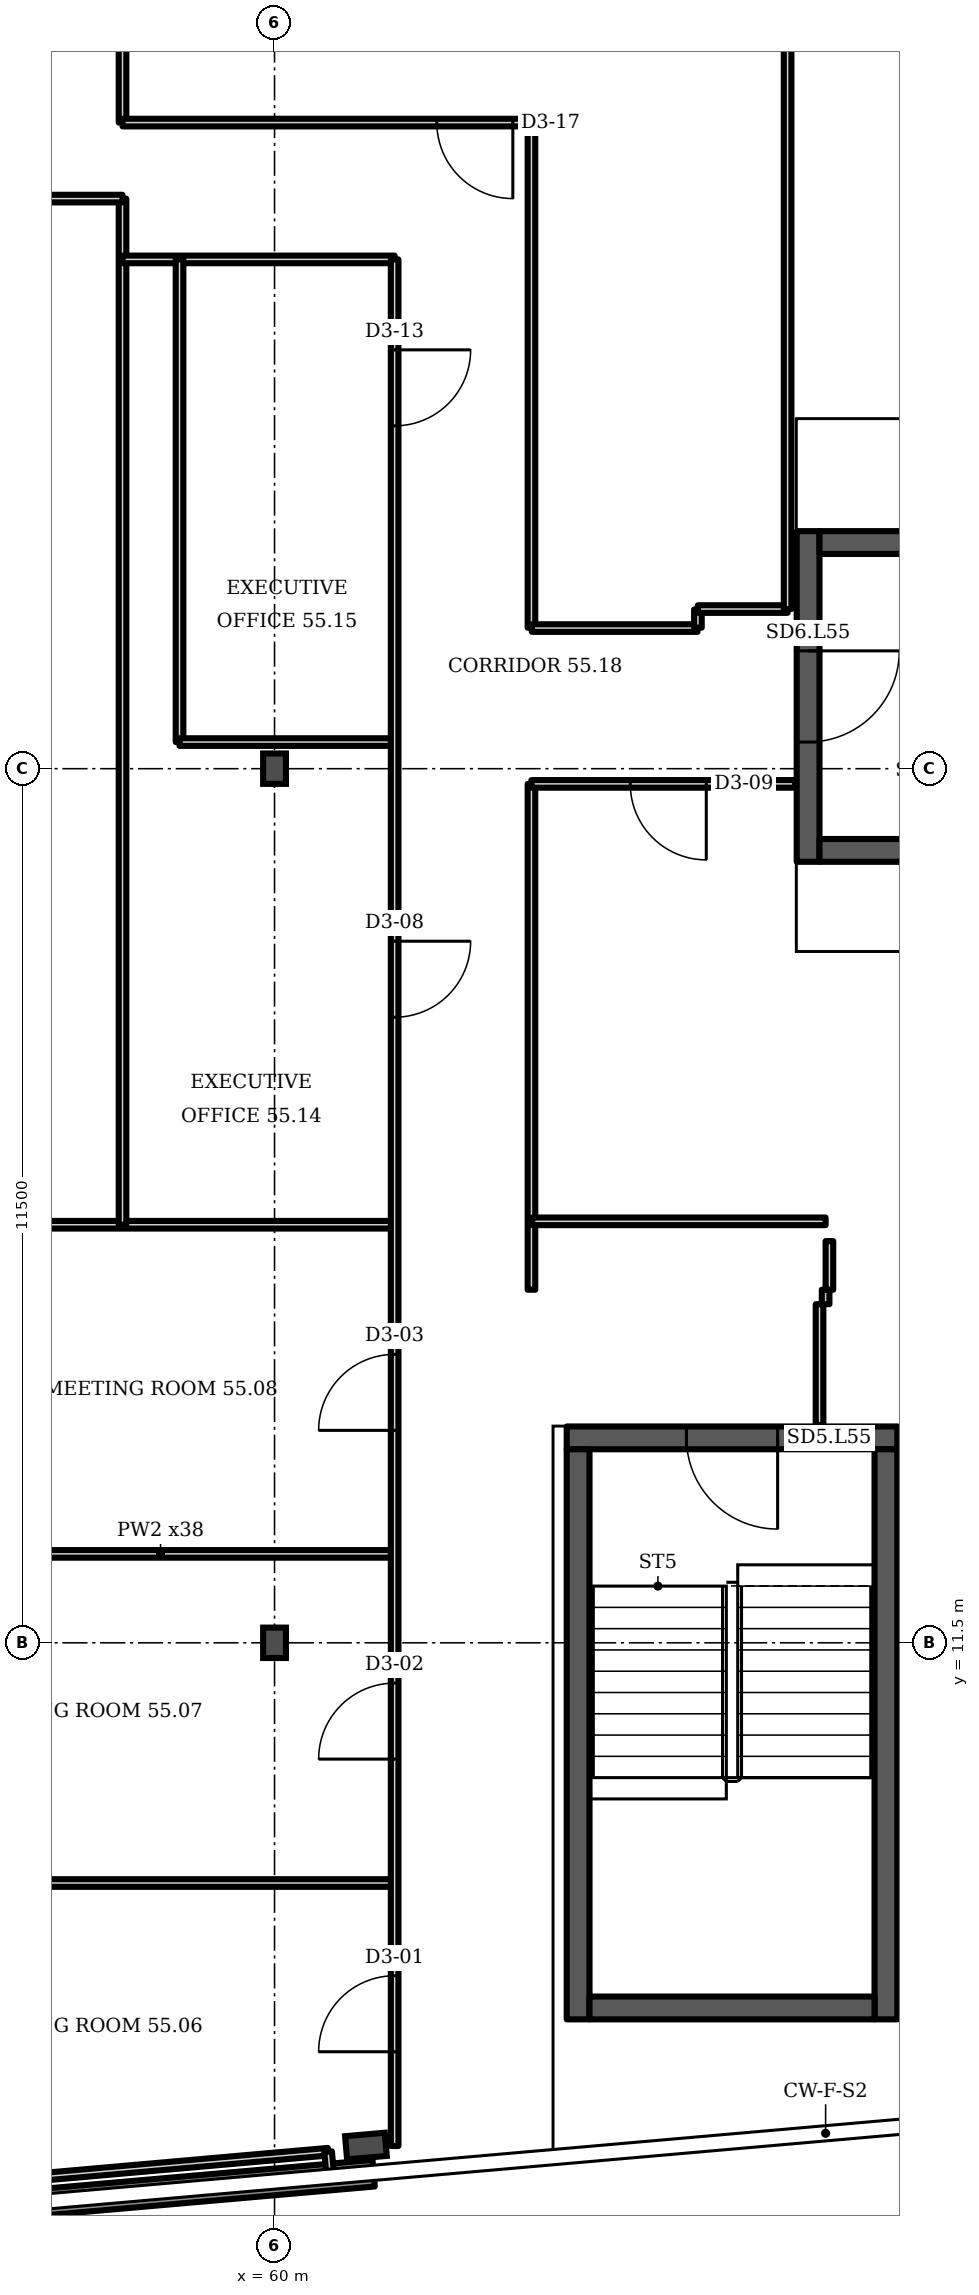
"""IFC4 building model, lengths in metres.
Left out: names, types, materials, properties, quantities, classifications, styles, units other than length and angle.
Written with IfcOpenShell. Run it as: python <this file> out.ifc"""

import sys

from ifc_helpers import new_model, si_unit, direction, frame, frame_2d, origin, origin_2d, place, context, subcontext, project, spatial, rectangle, i_section, extrude, element, fill, save


model = new_model("IFC4")
c1 = context("Model", 3, precision=1e-05, world=origin(), true_north=direction((0.0, 1.0)))
c2 = subcontext(c1, "Body", "Model", "MODEL_VIEW")
j1 = project(units=[si_unit("LENGTHUNIT", "METRE"), si_unit("PLANEANGLEUNIT", "RADIAN")], contexts=[c1])
p1 = place(None, origin())
s1 = spatial("IfcSite", under=j1, at=p1, CompositionType="ELEMENT")
p2 = place(p1, origin())
s2 = spatial("IfcBuilding", under=s1, at=p2, CompositionType="ELEMENT")
p3 = place(p2, frame((0.0, 0.0, 221.5)))
s3 = spatial("IfcBuildingStorey", under=s2, at=p3, CompositionType="ELEMENT", Elevation=221.5)
p4 = place(p3, frame((61.202, 4.879, 0.0), z_axis=(0.0, 0.0, 1.0), x_axis=(0.087156, -0.996197, 0.0)))
e1 = element("IfcColumn", 1, at=p4, inside=s3, PredefinedType="COLUMN", context=c2, shape_type="SweptSolid", body=[
    extrude(i_section(OverallWidth=0.306, OverallDepth=0.524, WebThickness=0.021, FlangeThickness=0.04, FilletRadius=0.027, at=origin_2d()), origin(), (0.0, 0.0, 1.0), 3.6),
])
for number, where, z_axis, x_axis in (
    (2, (60.0, 11.5, 0.0), (0.0, 0.0, 1.0), (1.0, 0.0, 0.0)),
    (3, (60.0, 23.0, 0.0), (0.0, 0.0, 1.0), (1.0, 0.0, 0.0)),
):
    element("IfcColumn", number, at=place(p3, frame(where, z_axis=z_axis, x_axis=x_axis)), inside=s3, PredefinedType="COLUMN", context=c2, shape_type="SweptSolid", body=[
        extrude(i_section(OverallWidth=0.3, OverallDepth=0.4, WebThickness=0.013, FlangeThickness=0.024, FilletRadius=0.027, at=origin_2d()), origin(), (0.0, 0.0, 1.0), 3.6),
    ])
p5 = place(p3, frame((49.545, 3.493, 0.0), z_axis=(0.0, 0.0, 1.0), x_axis=(0.996196, 0.087141, 0.0)))
e4 = element("IfcWall", 4, at=p5, inside=s3, PredefinedType="SOLIDWALL", context=c2, shape_type="SweptSolid", body=[
    extrude(rectangle(XDim=11.803, YDim=0.35, at=frame_2d((5.902, 0.0))), origin(), (0.0, 0.0, 1.0), 1.0),
])
p6 = place(p3, frame((63.844, 14.196, 0.0), z_axis=(0.0, 0.0, 1.0), x_axis=(1.0, 0.0, 0.0)))
e5 = element("IfcWall", 5, at=p6, inside=s3, PredefinedType="SHEAR", context=c2, shape_type="SweptSolid", body=[
    extrude(rectangle(XDim=4.35, YDim=0.3, at=frame_2d((2.175, 0.0))), origin(), (0.0, 0.0, 1.0), 3.2),
])
p7 = place(p6, frame((1.575, 0.0, 0.0)))
e6 = element("IfcOpeningElement", 6, at=p7, cuts=e5, PredefinedType="OPENING", context=c2, shape_type="SweptSolid", body=[
    extrude(rectangle(XDim=1.2, YDim=2.1, at=frame_2d((0.6, 1.05))), frame((0.0, 0.16, 0.0), z_axis=(0.0, -1.0, 0.0), x_axis=(1.0, 0.0, 0.0)), (0.0, 0.0, 1.0), 0.32),
])
p8 = place(p3, frame((67.02, 21.775, 0.0), z_axis=(0.0, 0.0, 1.0), x_axis=(0.0, 1.0, 0.0)))
e7 = element("IfcWall", 7, at=p8, inside=s3, PredefinedType="SHEAR", context=c2, shape_type="SweptSolid", body=[
    extrude(rectangle(XDim=4.35, YDim=0.3, at=frame_2d((2.175, 0.0))), origin(), (0.0, 0.0, 1.0), 3.2),
])
p9 = place(p8, frame((1.575, 0.0, 0.0)))
e8 = element("IfcOpeningElement", 8, at=p9, cuts=e7, PredefinedType="OPENING", context=c2, shape_type="SweptSolid", body=[
    extrude(rectangle(XDim=1.2, YDim=2.1, at=frame_2d((0.6, 1.05))), frame((0.0, 0.16, 0.0), z_axis=(0.0, -1.0, 0.0), x_axis=(1.0, 0.0, 0.0)), (0.0, 0.0, 1.0), 0.32),
])
p10 = place(p3, frame((39.04, 17.0, 0.0), z_axis=(0.0, 0.0, 1.0), x_axis=(1.0, 0.0, 0.0)))
e9 = element("IfcWall", 9, at=p10, inside=s3, PredefinedType="PARTITIONING", context=c2, shape_type="SweptSolid", body=[
    extrude(rectangle(XDim=22.54, YDim=0.1, at=frame_2d((11.27, 0.0))), origin(), (0.0, 0.0, 1.0), 3.2),
])
p11 = place(p3, frame((55.415, 4.34, 0.0), z_axis=(0.0, 0.0, 1.0), x_axis=(0.996159, 0.087534, 0.0)))
e10 = element("IfcWall", 10, at=p11, inside=s3, PredefinedType="PARTITIONING", context=c2, shape_type="SweptSolid", body=[
    extrude(rectangle(XDim=5.31, YDim=0.1, at=frame_2d((2.655, 0.0))), origin(), (0.0, 0.0, 1.0), 2.58),
])
for number, where, z_axis, x_axis in (
    (11, (55.42, 8.34, 0.0), (0.0, 0.0, 1.0), (1.0, 0.0, 0.0)),
    (12, (55.42, 12.67, 0.0), (0.0, 0.0, 1.0), (1.0, 0.0, 0.0)),
):
    element("IfcWall", number, at=place(p3, frame(where, z_axis=z_axis, x_axis=x_axis)), inside=s3, PredefinedType="PARTITIONING", context=c2, shape_type="SweptSolid", body=[
        extrude(rectangle(XDim=6.16, YDim=0.1, at=frame_2d((3.08, 0.0))), origin(), (0.0, 0.0, 1.0), 3.2),
    ])
p12 = place(p3, frame((58.0, 17.0, 0.0), z_axis=(0.0, 0.0, 1.0), x_axis=(0.0, 1.0, 0.0)))
e13 = element("IfcWall", 13, at=p12, inside=s3, PredefinedType="PARTITIONING", context=c2, shape_type="SweptSolid", body=[
    extrude(rectangle(XDim=13.5, YDim=0.1, at=frame_2d((6.75, 0.0))), origin(), (0.0, 0.0, 1.0), 3.2),
])
p13 = place(p3, frame((58.0, 29.7, 0.0), z_axis=(0.0, 0.0, 1.0), x_axis=(1.0, 0.0, 0.0)))
e14 = element("IfcWall", 14, at=p13, inside=s3, PredefinedType="PARTITIONING", context=c2, shape_type="SweptSolid", body=[
    extrude(rectangle(XDim=3.58, YDim=0.1, at=frame_2d((1.79, 0.0))), origin(), (0.0, 0.0, 1.0), 3.2),
])
p14 = place(p3, frame((58.0, 31.5, 0.0), z_axis=(0.0, 0.0, 1.0), x_axis=(0.0, 1.0, 0.0)))
e15 = element("IfcWall", 15, at=p14, inside=s3, PredefinedType="PARTITIONING", context=c2, shape_type="SweptSolid", body=[
    extrude(rectangle(XDim=2.48, YDim=0.1, at=frame_2d((1.24, 0.0))), origin(), (0.0, 0.0, 1.0), 3.2),
])
p15 = place(p3, frame((58.0, 31.5, 0.0), z_axis=(0.0, 0.0, 1.0), x_axis=(1.0, 0.0, 0.0)))
e16 = element("IfcWall", 16, at=p15, inside=s3, PredefinedType="PARTITIONING", context=c2, shape_type="SweptSolid", body=[
    extrude(rectangle(XDim=5.38, YDim=0.1, at=frame_2d((2.69, 0.0))), origin(), (0.0, 0.0, 1.0), 3.2),
])
p16 = place(p15, frame((4.135, 0.0, 0.0)))
e17 = element("IfcOpeningElement", 17, at=p16, cuts=e16, PredefinedType="OPENING", context=c2, shape_type="SweptSolid", body=[
    extrude(rectangle(XDim=1.0, YDim=2.1, at=frame_2d((0.5, 1.05))), frame((0.0, 0.06, 0.0), z_axis=(0.0, -1.0, 0.0), x_axis=(1.0, 0.0, 0.0)), (0.0, 0.0, 1.0), 0.12),
])
p17 = place(p3, frame((58.75, 23.35, 0.0), z_axis=(0.0, 0.0, 1.0), x_axis=(0.0, 1.0, 0.0)))
e18 = element("IfcWall", 18, at=p17, inside=s3, PredefinedType="PARTITIONING", context=c2, shape_type="SweptSolid", body=[
    extrude(rectangle(XDim=6.35, YDim=0.1, at=frame_2d((3.175, 0.0))), origin(), (0.0, 0.0, 1.0), 3.2),
])
p18 = place(p3, frame((58.75, 23.35, 0.0), z_axis=(0.0, 0.0, 1.0), x_axis=(1.0, 0.0, 0.0)))
e19 = element("IfcWall", 19, at=p18, inside=s3, PredefinedType="PARTITIONING", context=c2, shape_type="SweptSolid", body=[
    extrude(rectangle(XDim=2.83, YDim=0.1, at=frame_2d((1.415, 0.0))), origin(), (0.0, 0.0, 1.0), 3.2),
])
p19 = place(p3, frame((60.733, 4.497, 0.0), z_axis=(0.0, 0.0, 1.0), x_axis=(-0.090037, 0.995936, 0.0)))
e20 = element("IfcWall", 20, at=p19, inside=s3, PredefinedType="PARTITIONING", context=c2, shape_type="SweptSolid", body=[
    extrude(rectangle(XDim=0.309, YDim=0.1, at=frame_2d((0.155, 0.0))), origin(), (0.0, 0.0, 1.0), 3.2),
])
p20 = place(p3, frame((61.58, 4.88, 0.0), z_axis=(0.0, 0.0, 1.0), x_axis=(0.0, 1.0, 0.0)))
e21 = element("IfcWall", 21, at=p20, inside=s3, PredefinedType="PARTITIONING", context=c2, shape_type="SweptSolid", body=[
    extrude(rectangle(XDim=24.82, YDim=0.1, at=frame_2d((12.41, 0.0))), origin(), (0.0, 0.0, 1.0), 3.2),
])
p21 = place(p20, frame((1.24, 0.0, 0.0)))
e22 = element("IfcOpeningElement", 22, at=p21, cuts=e21, PredefinedType="OPENING", context=c2, shape_type="SweptSolid", body=[
    extrude(rectangle(XDim=1.0, YDim=2.1, at=frame_2d((0.5, 1.05))), frame((0.0, 0.06, 0.0), z_axis=(0.0, -1.0, 0.0), x_axis=(1.0, 0.0, 0.0)), (0.0, 0.0, 1.0), 0.12),
])
p22 = place(p20, frame((5.09, 0.0, 0.0)))
e23 = element("IfcOpeningElement", 23, at=p22, cuts=e21, PredefinedType="OPENING", context=c2, shape_type="SweptSolid", body=[
    extrude(rectangle(XDim=1.0, YDim=2.1, at=frame_2d((0.5, 1.05))), frame((0.0, 0.06, 0.0), z_axis=(0.0, -1.0, 0.0), x_axis=(1.0, 0.0, 0.0)), (0.0, 0.0, 1.0), 0.12),
])
p23 = place(p20, frame((9.415, 0.0, 0.0)))
e24 = element("IfcOpeningElement", 24, at=p23, cuts=e21, PredefinedType="OPENING", context=c2, shape_type="SweptSolid", body=[
    extrude(rectangle(XDim=1.0, YDim=2.1, at=frame_2d((0.5, 1.05))), frame((0.0, 0.06, 0.0), z_axis=(0.0, -1.0, 0.0), x_axis=(1.0, 0.0, 0.0)), (0.0, 0.0, 1.0), 0.12),
])
p24 = place(p20, frame((14.85, 0.0, 0.0)))
e25 = element("IfcOpeningElement", 25, at=p24, cuts=e21, PredefinedType="OPENING", context=c2, shape_type="SweptSolid", body=[
    extrude(rectangle(XDim=1.0, YDim=2.1, at=frame_2d((0.5, 1.05))), frame((0.0, 0.06, 0.0), z_axis=(0.0, -1.0, 0.0), x_axis=(1.0, 0.0, 0.0)), (0.0, 0.0, 1.0), 0.12),
])
p25 = place(p20, frame((22.63, 0.0, 0.0)))
e26 = element("IfcOpeningElement", 26, at=p25, cuts=e21, PredefinedType="OPENING", context=c2, shape_type="SweptSolid", body=[
    extrude(rectangle(XDim=1.0, YDim=2.1, at=frame_2d((0.5, 1.05))), frame((0.0, 0.06, 0.0), z_axis=(0.0, -1.0, 0.0), x_axis=(1.0, 0.0, 0.0)), (0.0, 0.0, 1.0), 0.12),
])
p26 = place(p3, frame((63.38, 16.145, 0.0), z_axis=(0.0, 0.0, 1.0), x_axis=(0.0, 1.0, 0.0)))
e27 = element("IfcWall", 27, at=p26, inside=s3, PredefinedType="PARTITIONING", context=c2, shape_type="SweptSolid", body=[
    extrude(rectangle(XDim=6.655, YDim=0.1, at=frame_2d((3.328, 0.0))), origin(), (0.0, 0.0, 1.0), 3.2),
])
p27 = place(p3, frame((63.38, 22.8, 0.0), z_axis=(0.0, 0.0, 1.0), x_axis=(1.0, 0.0, 0.0)))
e28 = element("IfcWall", 28, at=p27, inside=s3, PredefinedType="PARTITIONING", context=c2, shape_type="SweptSolid", body=[
    extrude(rectangle(XDim=3.47, YDim=0.1, at=frame_2d((1.735, 0.0))), origin(), (0.0, 0.0, 1.0), 3.2),
])
p28 = place(p27, frame((1.3, 0.0, 0.0)))
e29 = element("IfcOpeningElement", 29, at=p28, cuts=e28, PredefinedType="OPENING", context=c2, shape_type="SweptSolid", body=[
    extrude(rectangle(XDim=1.0, YDim=2.1, at=frame_2d((0.5, 1.05))), frame((0.0, 0.06, 0.0), z_axis=(0.0, -1.0, 0.0), x_axis=(1.0, 0.0, 0.0)), (0.0, 0.0, 1.0), 0.12),
])
p29 = place(p3, frame((63.38, 24.855, 0.0), z_axis=(0.0, 0.0, 1.0), x_axis=(0.0, 1.0, 0.0)))
e30 = element("IfcWall", 30, at=p29, inside=s3, PredefinedType="PARTITIONING", context=c2, shape_type="SweptSolid", body=[
    extrude(rectangle(XDim=6.645, YDim=0.1, at=frame_2d((3.323, 0.0))), origin(), (0.0, 0.0, 1.0), 3.2),
])
p30 = place(p3, frame((63.385, 24.85, 0.0), z_axis=(0.0, 0.0, 1.0), x_axis=(1.0, 0.0, 0.0)))
e31 = element("IfcWall", 31, at=p30, inside=s3, PredefinedType="PARTITIONING", context=c2, shape_type="SweptSolid", body=[
    extrude(rectangle(XDim=2.18, YDim=0.1, at=frame_2d((1.09, 0.0))), origin(), (0.0, 0.0, 1.0), 3.2),
])
p31 = place(p3, frame((63.39, 17.045, 0.0), z_axis=(0.0, 0.0, 1.0), x_axis=(1.0, 0.0, 0.0)))
e32 = element("IfcWall", 32, at=p31, inside=s3, PredefinedType="PARTITIONING", context=c2, shape_type="SweptSolid", body=[
    extrude(rectangle(XDim=3.86, YDim=0.1, at=frame_2d((1.93, 0.0))), origin(), (0.0, 0.0, 1.0), 3.2),
])
p32 = place(p3, frame((65.57, 24.855, 0.0), z_axis=(0.0, 0.0, 1.0), x_axis=(0.0, 1.0, 0.0)))
e33 = element("IfcWall", 33, at=p32, inside=s3, PredefinedType="PARTITIONING", context=c2, shape_type="SweptSolid", body=[
    extrude(rectangle(XDim=0.24, YDim=0.1, at=frame_2d((0.12, 0.0))), origin(), (0.0, 0.0, 1.0), 3.2),
])
p33 = place(p3, frame((65.57, 25.1, 0.0), z_axis=(0.0, 0.0, 1.0), x_axis=(1.0, 0.0, 0.0)))
e34 = element("IfcWall", 34, at=p33, inside=s3, PredefinedType="PARTITIONING", context=c2, shape_type="SweptSolid", body=[
    extrude(rectangle(XDim=1.18, YDim=0.1, at=frame_2d((0.59, 0.0))), origin(), (0.0, 0.0, 1.0), 3.2),
])
p34 = place(p3, frame((66.75, 25.1, 0.0), z_axis=(0.0, 0.0, 1.0), x_axis=(0.0, 1.0, 0.0)))
e35 = element("IfcWall", 35, at=p34, inside=s3, PredefinedType="PARTITIONING", context=c2, shape_type="SweptSolid", body=[
    extrude(rectangle(XDim=16.88, YDim=0.1, at=frame_2d((8.44, 0.0))), origin(), (0.0, 0.0, 1.0), 3.2),
])
p35 = place(p3, frame((67.17, 14.366, 0.0), z_axis=(0.0, 0.0, 1.0), x_axis=(0.0, 1.0, 0.0)))
e36 = element("IfcWall", 36, at=p35, inside=s3, PredefinedType="PARTITIONING", context=c2, shape_type="SweptSolid", body=[
    extrude(rectangle(XDim=1.589, YDim=0.1, at=frame_2d((0.794, 0.0))), origin(), (0.0, 0.0, 1.0), 3.2),
])
p36 = place(p3, frame((67.25, 15.955, 0.0), z_axis=(0.0, 0.0, 1.0), x_axis=(0.0, 1.0, 0.0)))
e37 = element("IfcWall", 37, at=p36, inside=s3, PredefinedType="PARTITIONING", context=c2, shape_type="SweptSolid", body=[
    extrude(rectangle(XDim=0.19, YDim=0.1, at=frame_2d((0.095, 0.0))), origin(), (0.0, 0.0, 1.0), 3.2),
])
p37 = place(p3, frame((67.3, 16.145, 0.0), z_axis=(0.0, 0.0, 1.0), x_axis=(0.0, 1.0, 0.0)))
e38 = element("IfcWall", 38, at=p37, inside=s3, PredefinedType="PARTITIONING", context=c2, shape_type="SweptSolid", body=[
    extrude(rectangle(XDim=0.64, YDim=0.1, at=frame_2d((0.32, 0.0))), origin(), (0.0, 0.0, 1.0), 3.2),
])
p38 = place(p3, frame((44.15, 30.5, 0.0), z_axis=(0.0, 0.0, 1.0), x_axis=(1.0, 0.0, 0.0)))
e39 = element("IfcWall", 39, at=p38, inside=s3, PredefinedType="PARTITIONING", context=c2, shape_type="SweptSolid", body=[
    extrude(rectangle(XDim=13.85, YDim=0.1, at=frame_2d((6.925, 0.0))), origin(), (0.0, 0.0, 1.0), 3.2),
])
p39 = place(p38, frame((6.77, 0.0, 0.0)))
e40 = element("IfcOpeningElement", 40, at=p39, cuts=e39, PredefinedType="OPENING", context=c2, shape_type="SweptSolid", body=[
    extrude(rectangle(XDim=1.0, YDim=2.1, at=frame_2d((0.5, 1.05))), frame((0.0, 0.06, 0.0), z_axis=(0.0, -1.0, 0.0), x_axis=(1.0, 0.0, 0.0)), (0.0, 0.0, 1.0), 0.12),
])
for number, where, z_axis, x_axis in (
    (41, (63.994, 6.546, 0.0), (0.0, 0.0, 1.0), (0.0, 1.0, 0.0)),
    (42, (68.044, 6.546, 0.0), (0.0, 0.0, 1.0), (0.0, 1.0, 0.0)),
):
    element("IfcWall", number, at=place(p3, frame(where, z_axis=z_axis, x_axis=x_axis)), inside=s3, PredefinedType="SHEAR", context=c2, shape_type="SweptSolid", body=[
        extrude(rectangle(XDim=7.5, YDim=0.3, at=frame_2d((3.75, 0.0))), origin(), (0.0, 0.0, 1.0), 3.2),
    ])
p40 = place(p3, frame((64.144, 6.696, 0.0), z_axis=(0.0, 0.0, 1.0), x_axis=(1.0, 0.0, 0.0)))
e43 = element("IfcWall", 43, at=p40, inside=s3, PredefinedType="SHEAR", context=c2, shape_type="SweptSolid", body=[
    extrude(rectangle(XDim=3.75, YDim=0.3, at=frame_2d((1.875, 0.0))), origin(), (0.0, 0.0, 1.0), 3.2),
])
for number, where, z_axis, x_axis in (
    (44, (67.17, 21.925, 0.0), (0.0, 0.0, 1.0), (1.0, 0.0, 0.0)),
    (45, (67.17, 25.975, 0.0), (0.0, 0.0, 1.0), (1.0, 0.0, 0.0)),
):
    element("IfcWall", number, at=place(p3, frame(where, z_axis=z_axis, x_axis=x_axis)), inside=s3, PredefinedType="SHEAR", context=c2, shape_type="SweptSolid", body=[
        extrude(rectangle(XDim=7.5, YDim=0.3, at=frame_2d((3.75, 0.0))), origin(), (0.0, 0.0, 1.0), 3.2),
    ])
p41 = place(p7, origin())
e46 = element("IfcDoor", 46, at=p41, inside=s3, OperationType="SINGLE_SWING_RIGHT", PredefinedType="DOOR", context=c2, shape_type="SweptSolid", body=[
    extrude(rectangle(XDim=1.2, YDim=2.1, at=frame_2d((0.6, 1.05))), frame((0.0, 0.025, 0.0), z_axis=(0.0, -1.0, 0.0), x_axis=(1.0, 0.0, 0.0)), (0.0, 0.0, 1.0), 0.05),
])
fill(e6, e46)
p42 = place(p9, origin())
e47 = element("IfcDoor", 47, at=p42, inside=s3, OperationType="SINGLE_SWING_RIGHT", PredefinedType="DOOR", context=c2, shape_type="SweptSolid", body=[
    extrude(rectangle(XDim=1.2, YDim=2.1, at=frame_2d((0.6, 1.05))), frame((0.0, 0.025, 0.0), z_axis=(0.0, -1.0, 0.0), x_axis=(1.0, 0.0, 0.0)), (0.0, 0.0, 1.0), 0.05),
])
fill(e8, e47)
p43 = place(p21, origin())
e48 = element("IfcDoor", 48, at=p43, inside=s3, OperationType="SINGLE_SWING_LEFT", PredefinedType="DOOR", context=c2, shape_type="SweptSolid", body=[
    extrude(rectangle(XDim=1.0, YDim=2.1, at=frame_2d((0.5, 1.05))), frame((0.0, 0.025, 0.0), z_axis=(0.0, -1.0, 0.0), x_axis=(1.0, 0.0, 0.0)), (0.0, 0.0, 1.0), 0.05),
])
fill(e22, e48)
p44 = place(p22, origin())
e49 = element("IfcDoor", 49, at=p44, inside=s3, OperationType="SINGLE_SWING_LEFT", PredefinedType="DOOR", context=c2, shape_type="SweptSolid", body=[
    extrude(rectangle(XDim=1.0, YDim=2.1, at=frame_2d((0.5, 1.05))), frame((0.0, 0.025, 0.0), z_axis=(0.0, -1.0, 0.0), x_axis=(1.0, 0.0, 0.0)), (0.0, 0.0, 1.0), 0.05),
])
fill(e23, e49)
p45 = place(p23, origin())
e50 = element("IfcDoor", 50, at=p45, inside=s3, OperationType="SINGLE_SWING_LEFT", PredefinedType="DOOR", context=c2, shape_type="SweptSolid", body=[
    extrude(rectangle(XDim=1.0, YDim=2.1, at=frame_2d((0.5, 1.05))), frame((0.0, 0.025, 0.0), z_axis=(0.0, -1.0, 0.0), x_axis=(1.0, 0.0, 0.0)), (0.0, 0.0, 1.0), 0.05),
])
fill(e24, e50)
p46 = place(p24, origin())
e51 = element("IfcDoor", 51, at=p46, inside=s3, OperationType="SINGLE_SWING_RIGHT", PredefinedType="DOOR", context=c2, shape_type="SweptSolid", body=[
    extrude(rectangle(XDim=1.0, YDim=2.1, at=frame_2d((0.5, 1.05))), frame((0.0, 0.025, 0.0), z_axis=(0.0, -1.0, 0.0), x_axis=(1.0, 0.0, 0.0)), (0.0, 0.0, 1.0), 0.05),
])
fill(e25, e51)
p47 = place(p28, origin())
e52 = element("IfcDoor", 52, at=p47, inside=s3, OperationType="SINGLE_SWING_RIGHT", PredefinedType="DOOR", context=c2, shape_type="SweptSolid", body=[
    extrude(rectangle(XDim=1.0, YDim=2.1, at=frame_2d((0.5, 1.05))), frame((0.0, 0.025, 0.0), z_axis=(0.0, -1.0, 0.0), x_axis=(1.0, 0.0, 0.0)), (0.0, 0.0, 1.0), 0.05),
])
fill(e29, e52)
p48 = place(p25, origin())
e53 = element("IfcDoor", 53, at=p48, inside=s3, OperationType="SINGLE_SWING_RIGHT", PredefinedType="DOOR", context=c2, shape_type="SweptSolid", body=[
    extrude(rectangle(XDim=1.0, YDim=2.1, at=frame_2d((0.5, 1.05))), frame((0.0, 0.025, 0.0), z_axis=(0.0, -1.0, 0.0), x_axis=(1.0, 0.0, 0.0)), (0.0, 0.0, 1.0), 0.05),
])
fill(e26, e53)
p49 = place(p16, origin())
e54 = element("IfcDoor", 54, at=p49, inside=s3, OperationType="SINGLE_SWING_RIGHT", PredefinedType="DOOR", context=c2, shape_type="SweptSolid", body=[
    extrude(rectangle(XDim=1.0, YDim=2.1, at=frame_2d((0.5, 1.05))), frame((0.0, 0.025, 0.0), z_axis=(0.0, -1.0, 0.0), x_axis=(1.0, 0.0, 0.0)), (0.0, 0.0, 1.0), 0.05),
])
fill(e17, e54)
save(model, sys.argv[1])
